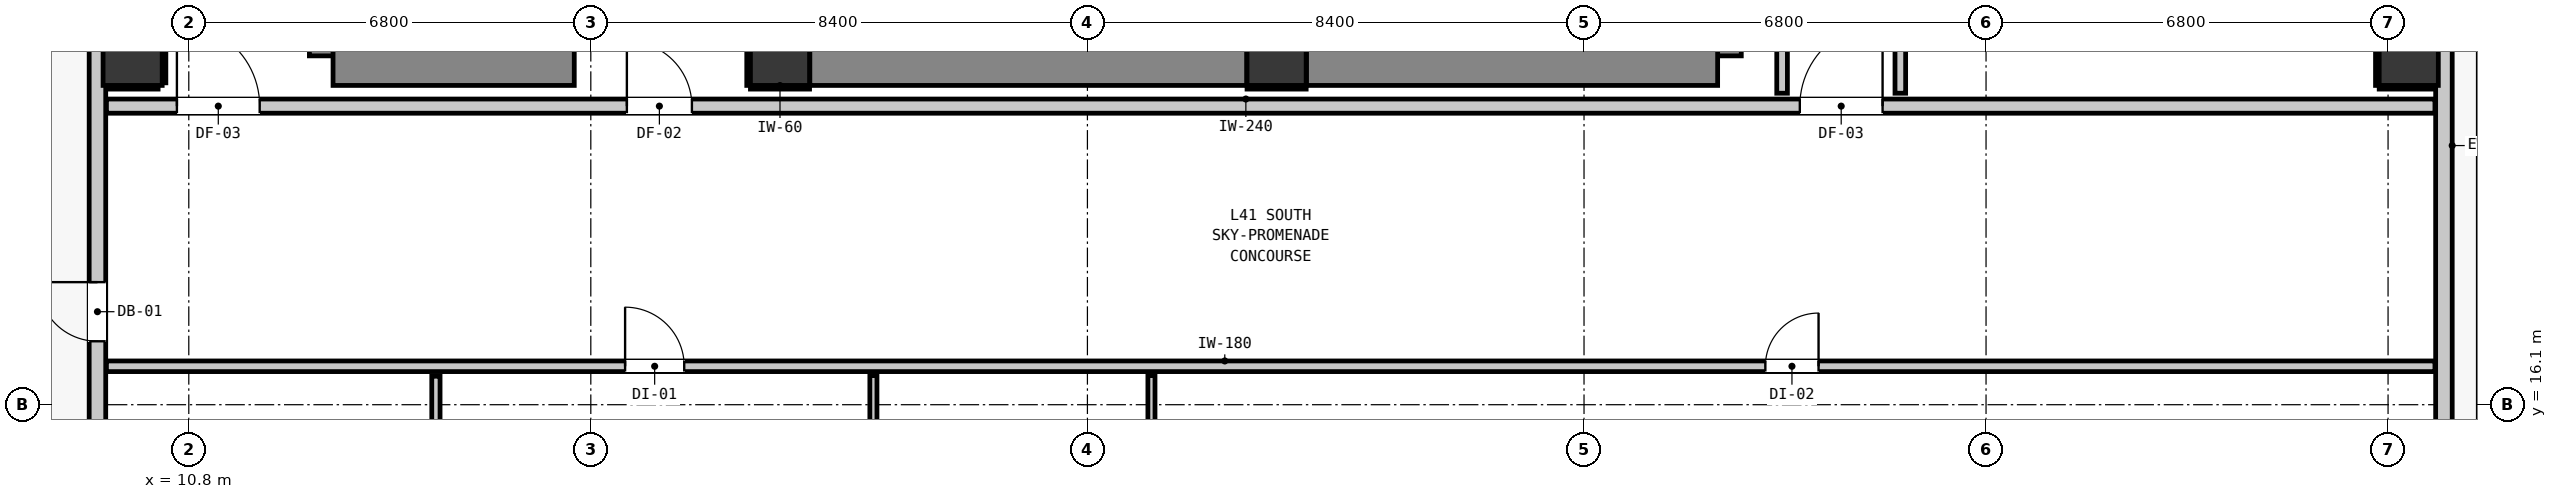
"""IFC4 building model, lengths in metres.
Left out: names, types, materials, properties, quantities, classifications, styles, units other than length and angle.
Written with IfcOpenShell. Run it as: python <this file> out.ifc"""

import sys

from ifc_helpers import new_model, si_unit, direction, frame, frame_2d, origin, origin_2d, place, context, subcontext, project, spatial, rectangle, extrude, element, fill, save


model = new_model("IFC4")
c1 = context("Model", 3, precision=1e-05, world=origin(), true_north=direction((0.0, 1.0)))
c2 = subcontext(c1, "Body", "Model", "MODEL_VIEW")
j1 = project(units=[si_unit("LENGTHUNIT", "METRE"), si_unit("PLANEANGLEUNIT", "RADIAN")], contexts=[c1])
p1 = place(None, origin())
s1 = spatial("IfcSite", under=j1, at=p1, CompositionType="ELEMENT")
p2 = place(p1, origin())
s2 = spatial("IfcBuilding", under=s1, at=p2, CompositionType="ELEMENT")
p3 = place(p2, frame((0.0, 0.0, 142.6)))
s3 = spatial("IfcBuildingStorey", under=s2, at=p3, CompositionType="ELEMENT", Elevation=142.6)
for number, where, z_axis, x_axis in (
    (1, (20.8, 22.0, 0.0), (0.0, 0.0, 1.0), (1.0, 0.0, 0.0)),
    (2, (29.2, 22.0, 0.0), (0.0, 0.0, 1.0), (1.0, 0.0, 0.0)),
):
    element("IfcColumn", number, at=place(p3, frame(where, z_axis=z_axis, x_axis=x_axis)), inside=s3, PredefinedType="COLUMN", context=c2, shape_type="SweptSolid", body=[
        extrude(rectangle(XDim=1.0, YDim=1.0, at=origin_2d()), origin(), (0.0, 0.0, 1.0), 3.32),
    ])
p4 = place(p3, frame((13.34, 22.0, 0.0), z_axis=(0.0, 0.0, 1.0), x_axis=(0.0, 1.0, 0.0)))
e3 = element("IfcWall", 3, at=p4, inside=s3, PredefinedType="SHEAR", context=c2, shape_type="SweptSolid", body=[
    extrude(rectangle(XDim=8.195, YDim=1.0, at=frame_2d((4.098, 0.0))), origin(), (0.0, 0.0, 1.0), 3.32),
])
p5 = place(p3, frame((13.24, 22.0, 0.0), z_axis=(0.0, 0.0, 1.0), x_axis=(1.0, 0.0, 0.0)))
e4 = element("IfcWall", 4, at=p5, inside=s3, PredefinedType="SHEAR", context=c2, shape_type="SweptSolid", body=[
    extrude(rectangle(XDim=4.08, YDim=1.0, at=frame_2d((2.04, 0.0))), origin(), (0.0, 0.0, 1.0), 3.32),
])
p6 = place(p3, frame((36.56, 22.0, 0.0), z_axis=(0.0, 0.0, 1.0), x_axis=(0.0, 1.0, 0.0)))
e5 = element("IfcWall", 5, at=p6, inside=s3, PredefinedType="SHEAR", context=c2, shape_type="SweptSolid", body=[
    extrude(rectangle(XDim=8.195, YDim=1.0, at=frame_2d((4.098, 0.0))), origin(), (0.0, 0.0, 1.0), 3.32),
])
p7 = place(p3, frame((29.705, 22.0, 0.0), z_axis=(0.0, 0.0, 1.0), x_axis=(1.0, 0.0, 0.0)))
e6 = element("IfcWall", 6, at=p7, inside=s3, PredefinedType="SHEAR", context=c2, shape_type="SweptSolid", body=[
    extrude(rectangle(XDim=6.955, YDim=1.0, at=frame_2d((3.478, 0.0))), origin(), (0.0, 0.0, 1.0), 3.32),
])
p8 = place(p3, frame((21.305, 22.0, 0.0), z_axis=(0.0, 0.0, 1.0), x_axis=(1.0, 0.0, 0.0)))
e7 = element("IfcWall", 7, at=p8, inside=s3, PredefinedType="SHEAR", context=c2, shape_type="SweptSolid", body=[
    extrude(rectangle(XDim=7.39, YDim=1.0, at=frame_2d((3.695, 0.0))), origin(), (0.0, 0.0, 1.0), 3.32),
])
for number, where, z_axis, x_axis in (
    (8, (9.85, 22.0, 0.0), (0.0, 0.0, 1.0), (1.0, 0.0, 0.0)),
    (9, (48.35, 22.0, 0.0), (0.0, 0.0, 1.0), (1.0, 0.0, 0.0)),
):
    element("IfcColumn", number, at=place(p3, frame(where, z_axis=z_axis, x_axis=x_axis)), inside=s3, PredefinedType="COLUMN", context=c2, shape_type="SweptSolid", body=[
        extrude(rectangle(XDim=1.0, YDim=1.0, at=origin_2d()), origin(), (0.0, 0.0, 1.0), 2.9),
    ])
p9 = place(p3, frame((9.255, 11.355, 0.0), z_axis=(0.0, 0.0, 1.0), x_axis=(0.0, 1.0, 0.0)))
e10 = element("IfcWall", 10, at=p9, inside=s3, PredefinedType="STANDARD", context=c2, shape_type="SweptSolid", body=[
    extrude(rectangle(XDim=32.29, YDim=0.28, at=frame_2d((16.145, 0.0))), origin(), (0.0, 0.0, 1.0), 2.9),
])
p10 = place(p9, frame((5.818, 0.0, 0.0)))
e11 = element("IfcOpeningElement", 11, at=p10, cuts=e10, PredefinedType="OPENING", context=c2, shape_type="SweptSolid", body=[
    extrude(rectangle(XDim=1.0, YDim=2.15, at=frame_2d((0.5, 1.075))), frame((0.0, 0.15, 0.0), z_axis=(0.0, -1.0, 0.0), x_axis=(1.0, 0.0, 0.0)), (0.0, 0.0, 1.0), 0.3),
])
p11 = place(p9, frame((0.544, 0.0, 0.85)))
e12 = element("IfcOpeningElement", 12, at=p11, cuts=e10, PredefinedType="OPENING", context=c2, shape_type="SweptSolid", body=[
    extrude(rectangle(XDim=1.05, YDim=1.65, at=frame_2d((0.525, 0.825))), frame((0.0, 0.15, 0.0), z_axis=(0.0, -1.0, 0.0), x_axis=(1.0, 0.0, 0.0)), (0.0, 0.0, 1.0), 0.3),
])
p12 = place(p3, frame((48.945, 43.645, 0.0), z_axis=(0.0, 0.0, 1.0), x_axis=(0.0, -1.0, 0.0)))
e13 = element("IfcWall", 13, at=p12, inside=s3, PredefinedType="STANDARD", context=c2, shape_type="SweptSolid", body=[
    extrude(rectangle(XDim=32.29, YDim=0.28, at=frame_2d((16.145, 0.0))), origin(), (0.0, 0.0, 1.0), 2.9),
])
p13 = place(p12, frame((5.467, 0.0, 0.0)))
e14 = element("IfcOpeningElement", 14, at=p13, cuts=e13, PredefinedType="OPENING", context=c2, shape_type="SweptSolid", body=[
    extrude(rectangle(XDim=1.0, YDim=2.15, at=frame_2d((0.5, 1.075))), frame((0.0, 0.15, 0.0), z_axis=(0.0, -1.0, 0.0), x_axis=(1.0, 0.0, 0.0)), (0.0, 0.0, 1.0), 0.3),
])
p14 = place(p12, frame((29.073, 0.0, 0.85)))
e15 = element("IfcOpeningElement", 15, at=p14, cuts=e13, PredefinedType="OPENING", context=c2, shape_type="SweptSolid", body=[
    extrude(rectangle(XDim=1.05, YDim=1.65, at=frame_2d((0.525, 0.825))), frame((0.0, 0.15, 0.0), z_axis=(0.0, -1.0, 0.0), x_axis=(1.0, 0.0, 0.0)), (0.0, 0.0, 1.0), 0.3),
])
p15 = place(p12, frame((0.318, 0.0, 0.85)))
e16 = element("IfcOpeningElement", 16, at=p15, cuts=e13, PredefinedType="OPENING", context=c2, shape_type="SweptSolid", body=[
    extrude(rectangle(XDim=1.05, YDim=1.65, at=frame_2d((0.525, 0.825))), frame((0.0, 0.15, 0.0), z_axis=(0.0, -1.0, 0.0), x_axis=(1.0, 0.0, 0.0)), (0.0, 0.0, 1.0), 0.3),
])
p16 = place(p12, frame((16.201, 0.0, 0.85)))
e17 = element("IfcOpeningElement", 17, at=p16, cuts=e13, PredefinedType="OPENING", context=c2, shape_type="SweptSolid", body=[
    extrude(rectangle(XDim=1.05, YDim=1.65, at=frame_2d((0.525, 0.825))), frame((0.0, 0.15, 0.0), z_axis=(0.0, -1.0, 0.0), x_axis=(1.0, 0.0, 0.0)), (0.0, 0.0, 1.0), 0.3),
])
p17 = place(p12, frame((10.57, 0.0, 0.85)))
e18 = element("IfcOpeningElement", 18, at=p17, cuts=e13, PredefinedType="OPENING", context=c2, shape_type="SweptSolid", body=[
    extrude(rectangle(XDim=1.05, YDim=1.65, at=frame_2d((0.525, 0.825))), frame((0.0, 0.15, 0.0), z_axis=(0.0, -1.0, 0.0), x_axis=(1.0, 0.0, 0.0)), (0.0, 0.0, 1.0), 0.3),
])
p18 = place(p3, frame((9.407, 21.15, 0.0), z_axis=(0.0, 0.0, 1.0), x_axis=(1.0, 0.0, 0.0)))
e19 = element("IfcWall", 19, at=p18, inside=s3, PredefinedType="PARTITIONING", context=c2, shape_type="SweptSolid", body=[
    extrude(rectangle(XDim=39.386, YDim=0.24, at=frame_2d((19.693, 0.0))), origin(), (0.0, 0.0, 1.0), 2.9),
])
p19 = place(p18, frame((8.803, 0.0, 0.0)))
e20 = element("IfcOpeningElement", 20, at=p19, cuts=e19, PredefinedType="OPENING", context=c2, shape_type="SweptSolid", body=[
    extrude(rectangle(XDim=1.1, YDim=2.15, at=frame_2d((0.55, 1.075))), frame((0.0, 0.13, 0.0), z_axis=(0.0, -1.0, 0.0), x_axis=(1.0, 0.0, 0.0)), (0.0, 0.0, 1.0), 0.26),
])
p20 = place(p18, frame((1.192, 0.0, 0.0)))
e21 = element("IfcOpeningElement", 21, at=p20, cuts=e19, PredefinedType="OPENING", context=c2, shape_type="SweptSolid", body=[
    extrude(rectangle(XDim=1.4, YDim=2.15, at=frame_2d((0.7, 1.075))), frame((0.0, 0.13, 0.0), z_axis=(0.0, -1.0, 0.0), x_axis=(1.0, 0.0, 0.0)), (0.0, 0.0, 1.0), 0.26),
])
p21 = place(p18, frame((28.643, 0.0, 0.0)))
e22 = element("IfcOpeningElement", 22, at=p21, cuts=e19, PredefinedType="OPENING", context=c2, shape_type="SweptSolid", body=[
    extrude(rectangle(XDim=1.4, YDim=2.15, at=frame_2d((0.7, 1.075))), frame((0.0, 0.13, 0.0), z_axis=(0.0, -1.0, 0.0), x_axis=(1.0, 0.0, 0.0)), (0.0, 0.0, 1.0), 0.26),
])
p22 = place(p3, frame((9.407, 16.75, 0.0), z_axis=(0.0, 0.0, 1.0), x_axis=(1.0, 0.0, 0.0)))
e23 = element("IfcWall", 23, at=p22, inside=s3, PredefinedType="PARTITIONING", context=c2, shape_type="SweptSolid", body=[
    extrude(rectangle(XDim=39.386, YDim=0.18, at=frame_2d((19.693, 0.0))), origin(), (0.0, 0.0, 1.0), 2.9),
])
p23 = place(p22, frame((8.773, 0.0, 0.0)))
e24 = element("IfcOpeningElement", 24, at=p23, cuts=e23, PredefinedType="OPENING", context=c2, shape_type="SweptSolid", body=[
    extrude(rectangle(XDim=1.0, YDim=2.15, at=frame_2d((0.5, 1.075))), frame((0.0, 0.1, 0.0), z_axis=(0.0, -1.0, 0.0), x_axis=(1.0, 0.0, 0.0)), (0.0, 0.0, 1.0), 0.2),
])
p24 = place(p22, frame((28.06, 0.0, 0.0)))
e25 = element("IfcOpeningElement", 25, at=p24, cuts=e23, PredefinedType="OPENING", context=c2, shape_type="SweptSolid", body=[
    extrude(rectangle(XDim=0.9, YDim=2.1, at=frame_2d((0.45, 1.05))), frame((0.0, 0.1, 0.0), z_axis=(0.0, -1.0, 0.0), x_axis=(1.0, 0.0, 0.0)), (0.0, 0.0, 1.0), 0.2),
])
p25 = place(p3, frame((37.75, 21.368, 0.0), z_axis=(0.0, 0.0, 1.0), x_axis=(0.0, 1.0, 0.0)))
e26 = element("IfcWall", 26, at=p25, inside=s3, PredefinedType="PARTITIONING", context=c2, shape_type="SweptSolid", body=[
    extrude(rectangle(XDim=18.694, YDim=0.18, at=frame_2d((9.347, 0.0))), origin(), (0.0, 0.0, 1.0), 2.9),
])
p26 = place(p3, frame((39.75, 21.368, 0.0), z_axis=(0.0, 0.0, 1.0), x_axis=(0.0, 1.0, 0.0)))
e27 = element("IfcWall", 27, at=p26, inside=s3, PredefinedType="PARTITIONING", context=c2, shape_type="SweptSolid", body=[
    extrude(rectangle(XDim=3.193, YDim=0.18, at=frame_2d((1.597, 0.0))), origin(), (0.0, 0.0, 1.0), 2.9),
])
p27 = place(p3, frame((14.98, 13.652, 0.0), z_axis=(0.0, 0.0, 1.0), x_axis=(0.0, 1.0, 0.0)))
e28 = element("IfcWall", 28, at=p27, inside=s3, PredefinedType="PARTITIONING", context=c2, shape_type="SweptSolid", body=[
    extrude(rectangle(XDim=2.93, YDim=0.14, at=frame_2d((1.465, 0.0))), origin(), (0.0, 0.0, 1.0), 2.9),
])
p28 = place(p27, frame((1.032, 0.0, 0.0)))
e29 = element("IfcOpeningElement", 29, at=p28, cuts=e28, PredefinedType="OPENING", context=c2, shape_type="SweptSolid", body=[
    extrude(rectangle(XDim=0.86, YDim=2.02, at=frame_2d((0.43, 1.01))), frame((0.0, 0.08, 0.0), z_axis=(0.0, -1.0, 0.0), x_axis=(1.0, 0.0, 0.0)), (0.0, 0.0, 1.0), 0.16),
])
p29 = place(p3, frame((22.38, 13.642, 0.0), z_axis=(0.0, 0.0, 1.0), x_axis=(0.0, 1.0, 0.0)))
e30 = element("IfcWall", 30, at=p29, inside=s3, PredefinedType="PARTITIONING", context=c2, shape_type="SweptSolid", body=[
    extrude(rectangle(XDim=2.95, YDim=0.12, at=frame_2d((1.475, 0.0))), origin(), (0.0, 0.0, 1.0), 2.9),
])
p30 = place(p29, frame((1.022, 0.0, 0.0)))
e31 = element("IfcOpeningElement", 31, at=p30, cuts=e30, PredefinedType="OPENING", context=c2, shape_type="SweptSolid", body=[
    extrude(rectangle(XDim=0.9, YDim=2.1, at=frame_2d((0.45, 1.05))), frame((0.0, 0.07, 0.0), z_axis=(0.0, -1.0, 0.0), x_axis=(1.0, 0.0, 0.0)), (0.0, 0.0, 1.0), 0.14),
])
p31 = place(p3, frame((27.083, 13.642, 0.0), z_axis=(0.0, 0.0, 1.0), x_axis=(0.0, 1.0, 0.0)))
e32 = element("IfcWall", 32, at=p31, inside=s3, PredefinedType="PARTITIONING", context=c2, shape_type="SweptSolid", body=[
    extrude(rectangle(XDim=2.95, YDim=0.12, at=frame_2d((1.475, 0.0))), origin(), (0.0, 0.0, 1.0), 2.9),
])
for number, where, z_axis, x_axis in (
    (33, (20.3, 21.468, 0.0), (0.0, 0.0, 1.0), (1.0, 0.0, 0.0)),
    (34, (20.268, 21.5, 0.0), (0.0, 0.0, 1.0), (0.0, 1.0, 0.0)),
    (35, (28.7, 21.468, 0.0), (0.0, 0.0, 1.0), (1.0, 0.0, 0.0)),
):
    element("IfcWall", number, at=place(p3, frame(where, z_axis=z_axis, x_axis=x_axis)), inside=s3, PredefinedType="PARTITIONING", context=c2, shape_type="SweptSolid", body=[
        extrude(rectangle(XDim=1.0, YDim=0.06, at=frame_2d((0.5, 0.0))), origin(), (0.0, 0.0, 1.0), 0.905),
    ])
p32 = place(p3, frame((9.41, 21.468, 0.0), z_axis=(0.0, 0.0, 1.0), x_axis=(1.0, 0.0, 0.0)))
e36 = element("IfcWall", 36, at=p32, inside=s3, PredefinedType="PARTITIONING", context=c2, shape_type="SweptSolid", body=[
    extrude(rectangle(XDim=0.871, YDim=0.06, at=frame_2d((0.436, 0.0))), origin(), (0.0, 0.0, 1.0), 0.905),
])
p33 = place(p3, frame((10.382, 21.544, 0.0), z_axis=(0.0, 0.0, 1.0), x_axis=(0.0, 1.0, 0.0)))
e37 = element("IfcWall", 37, at=p33, inside=s3, PredefinedType="PARTITIONING", context=c2, shape_type="SweptSolid", body=[
    extrude(rectangle(XDim=0.956, YDim=0.06, at=frame_2d((0.478, 0.0))), origin(), (0.0, 0.0, 1.0), 1.45),
])
p34 = place(p3, frame((47.85, 21.468, 0.0), z_axis=(0.0, 0.0, 1.0), x_axis=(1.0, 0.0, 0.0)))
e38 = element("IfcWall", 38, at=p34, inside=s3, PredefinedType="PARTITIONING", context=c2, shape_type="SweptSolid", body=[
    extrude(rectangle(XDim=0.94, YDim=0.06, at=frame_2d((0.47, 0.0))), origin(), (0.0, 0.0, 1.0), 0.905),
])
p35 = place(p3, frame((47.818, 21.5, 0.0), z_axis=(0.0, 0.0, 1.0), x_axis=(0.0, 1.0, 0.0)))
e39 = element("IfcWall", 39, at=p35, inside=s3, PredefinedType="PARTITIONING", context=c2, shape_type="SweptSolid", body=[
    extrude(rectangle(XDim=1.0, YDim=0.06, at=frame_2d((0.5, 0.0))), origin(), (0.0, 0.0, 1.0), 1.45),
])
p36 = place(p10, origin())
e40 = element("IfcDoor", 40, at=p36, inside=s3, OperationType="SINGLE_SWING_RIGHT", PredefinedType="DOOR", context=c2, shape_type="SweptSolid", body=[
    extrude(rectangle(XDim=1.0, YDim=2.15, at=frame_2d((0.5, 1.075))), frame((0.0, 0.025, 0.0), z_axis=(0.0, -1.0, 0.0), x_axis=(1.0, 0.0, 0.0)), (0.0, 0.0, 1.0), 0.05),
])
fill(e11, e40)
p37 = place(p19, origin())
e41 = element("IfcDoor", 41, at=p37, inside=s3, OperationType="SINGLE_SWING_LEFT", PredefinedType="DOOR", context=c2, shape_type="SweptSolid", body=[
    extrude(rectangle(XDim=1.1, YDim=2.15, at=frame_2d((0.55, 1.075))), frame((0.0, 0.025, 0.0), z_axis=(0.0, -1.0, 0.0), x_axis=(1.0, 0.0, 0.0)), (0.0, 0.0, 1.0), 0.05),
])
fill(e20, e41)
p38 = place(p20, origin())
e42 = element("IfcDoor", 42, at=p38, inside=s3, OperationType="SINGLE_SWING_LEFT", PredefinedType="DOOR", context=c2, shape_type="SweptSolid", body=[
    extrude(rectangle(XDim=1.4, YDim=2.15, at=frame_2d((0.7, 1.075))), frame((0.0, 0.025, 0.0), z_axis=(0.0, -1.0, 0.0), x_axis=(1.0, 0.0, 0.0)), (0.0, 0.0, 1.0), 0.05),
])
fill(e21, e42)
p39 = place(p21, origin())
e43 = element("IfcDoor", 43, at=p39, inside=s3, OperationType="SINGLE_SWING_RIGHT", PredefinedType="DOOR", context=c2, shape_type="SweptSolid", body=[
    extrude(rectangle(XDim=1.4, YDim=2.15, at=frame_2d((0.7, 1.075))), frame((0.0, 0.025, 0.0), z_axis=(0.0, -1.0, 0.0), x_axis=(1.0, 0.0, 0.0)), (0.0, 0.0, 1.0), 0.05),
])
fill(e22, e43)
p40 = place(p23, origin())
e44 = element("IfcDoor", 44, at=p40, inside=s3, OperationType="SINGLE_SWING_LEFT", PredefinedType="DOOR", context=c2, shape_type="SweptSolid", body=[
    extrude(rectangle(XDim=1.0, YDim=2.15, at=frame_2d((0.5, 1.075))), frame((0.0, 0.025, 0.0), z_axis=(0.0, -1.0, 0.0), x_axis=(1.0, 0.0, 0.0)), (0.0, 0.0, 1.0), 0.05),
])
fill(e24, e44)
p41 = place(p24, origin())
e45 = element("IfcDoor", 45, at=p41, inside=s3, OperationType="SINGLE_SWING_RIGHT", PredefinedType="DOOR", context=c2, shape_type="SweptSolid", body=[
    extrude(rectangle(XDim=0.9, YDim=2.1, at=frame_2d((0.45, 1.05))), frame((0.0, 0.025, 0.0), z_axis=(0.0, -1.0, 0.0), x_axis=(1.0, 0.0, 0.0)), (0.0, 0.0, 1.0), 0.05),
])
fill(e25, e45)
save(model, sys.argv[1])
